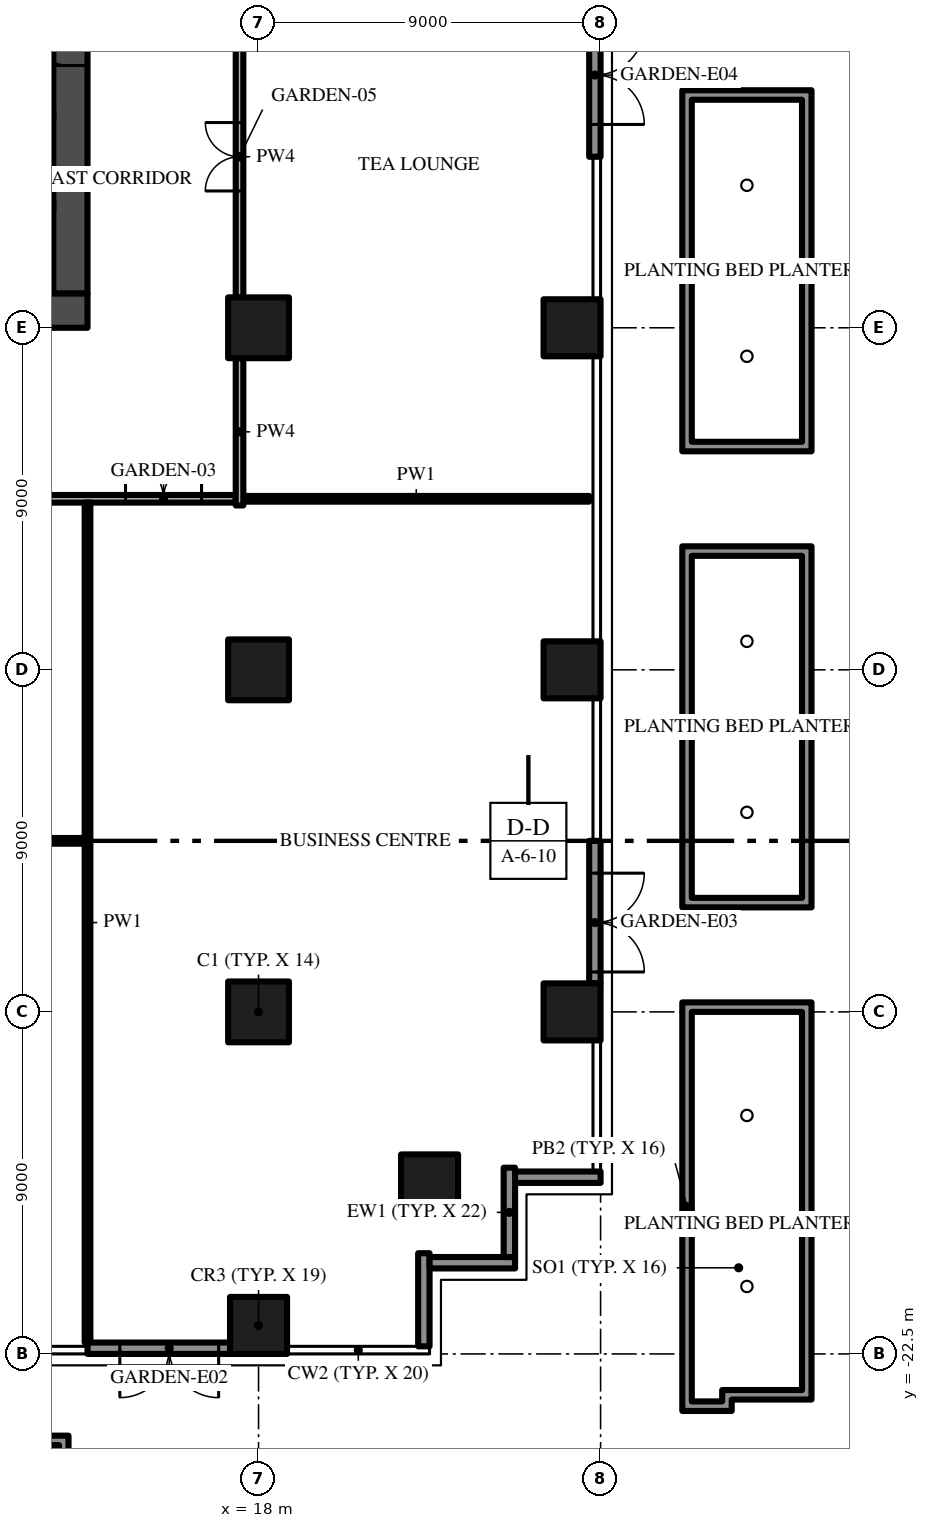
"""IFC4 building model, lengths in metres.
Left out: names, types, materials, properties, quantities, classifications, styles, units other than length and angle.
Written with IfcOpenShell. Run it as: python <this file> out.ifc"""

import sys

from ifc_helpers import new_model, si_unit, direction, frame, frame_2d, origin, origin_2d, place, context, subcontext, project, spatial, polyline, rectangle, outline, extrude, element, fill, save


model = new_model("IFC4")
c1 = context("Model", 3, precision=1e-05, world=origin(), true_north=direction((0.0, 1.0)))
c2 = subcontext(c1, "Body", "Model", "MODEL_VIEW")
j1 = project(units=[si_unit("LENGTHUNIT", "METRE"), si_unit("PLANEANGLEUNIT", "RADIAN")], contexts=[c1])
p1 = place(None, origin())
s1 = spatial("IfcSite", under=j1, at=p1, CompositionType="ELEMENT")
p2 = place(p1, origin())
s2 = spatial("IfcBuilding", under=s1, at=p2, CompositionType="ELEMENT")
p3 = place(p2, frame((0.0, 0.0, 10.5)))
s3 = spatial("IfcBuildingStorey", under=s2, at=p3, CompositionType="ELEMENT", Elevation=10.5)
p4 = place(p3, frame((-13.5, 4.95, -0.35), z_axis=(0.0, 0.0, 1.0), x_axis=(1.0, 0.0, 0.0)))
e1 = element("IfcWall", 1, at=p4, inside=s3, PredefinedType="SHEAR", context=c2, shape_type="SweptSolid", body=[
    extrude(rectangle(XDim=27.0, YDim=0.9, at=frame_2d((13.5, 0.0))), origin(), (0.0, 0.0, 1.0), 4.55),
])
p5 = place(p4, frame((12.0, 0.0, 0.35)))
e2 = element("IfcOpeningElement", 2, at=p5, cuts=e1, PredefinedType="OPENING", context=c2, shape_type="SweptSolid", body=[
    extrude(rectangle(XDim=3.0, YDim=2.4, at=frame_2d((1.5, 1.2))), frame((0.0, 0.46, 0.0), z_axis=(0.0, -1.0, 0.0), x_axis=(1.0, 0.0, 0.0)), (0.0, 0.0, 1.0), 0.92),
])
p6 = place(p4, frame((4.9, 0.0, 0.35)))
e3 = element("IfcOpeningElement", 3, at=p6, cuts=e1, PredefinedType="OPENING", context=c2, shape_type="SweptSolid", body=[
    extrude(rectangle(XDim=1.2, YDim=2.2, at=frame_2d((0.6, 1.1))), frame((0.0, 0.46, 0.0), z_axis=(0.0, -1.0, 0.0), x_axis=(1.0, 0.0, 0.0)), (0.0, 0.0, 1.0), 0.92),
])
p7 = place(p4, frame((20.75, 0.0, 0.35)))
e4 = element("IfcOpeningElement", 4, at=p7, cuts=e1, PredefinedType="OPENING", context=c2, shape_type="SweptSolid", body=[
    extrude(rectangle(XDim=1.5, YDim=2.2, at=frame_2d((0.75, 1.1))), frame((0.0, 0.46, 0.0), z_axis=(0.0, -1.0, 0.0), x_axis=(1.0, 0.0, 0.0)), (0.0, 0.0, 1.0), 0.92),
])
p8 = place(p4, frame((17.4, 0.0, 0.35)))
e5 = element("IfcOpeningElement", 5, at=p8, cuts=e1, PredefinedType="OPENING", context=c2, shape_type="SweptSolid", body=[
    extrude(rectangle(XDim=1.2, YDim=2.2, at=frame_2d((0.6, 1.1))), frame((0.0, 0.46, 0.0), z_axis=(0.0, -1.0, 0.0), x_axis=(1.0, 0.0, 0.0)), (0.0, 0.0, 1.0), 0.92),
])
p9 = place(p3, frame((13.05, 5.4, -0.35), z_axis=(0.0, 0.0, 1.0), x_axis=(0.0, 1.0, 0.0)))
e6 = element("IfcWall", 6, at=p9, inside=s3, PredefinedType="SHEAR", context=c2, shape_type="SweptSolid", body=[
    extrude(rectangle(XDim=16.2, YDim=0.9, at=frame_2d((8.1, 0.0))), origin(), (0.0, 0.0, 1.0), 4.55),
])
p10 = place(p9, frame((6.0, 0.0, 0.35)))
e7 = element("IfcOpeningElement", 7, at=p10, cuts=e6, PredefinedType="OPENING", context=c2, shape_type="SweptSolid", body=[
    extrude(rectangle(XDim=1.2, YDim=2.2, at=frame_2d((0.6, 1.1))), frame((0.0, 0.46, 0.0), z_axis=(0.0, -1.0, 0.0), x_axis=(1.0, 0.0, 0.0)), (0.0, 0.0, 1.0), 0.92),
])
p11 = place(p3, frame((18.0, -13.5, 0.0), z_axis=(0.0, 0.0, 1.0), x_axis=(1.0, 0.0, 0.0)))
e8 = element("IfcColumn", 8, at=p11, inside=s3, PredefinedType="COLUMN", context=c2, shape_type="SweptSolid", body=[
    extrude(rectangle(XDim=1.6, YDim=1.6, at=origin_2d()), origin(), (0.0, 0.0, 1.0), 4.2),
])
p12 = place(p3, frame((18.0, -21.75, 0.0), z_axis=(0.0, 0.0, 1.0), x_axis=(1.0, 0.0, 0.0)))
e9 = element("IfcColumn", 9, at=p12, inside=s3, PredefinedType="COLUMN", context=c2, shape_type="SweptSolid", body=[
    extrude(rectangle(XDim=1.5, YDim=1.5, at=origin_2d()), origin(), (0.0, 0.0, 1.0), 4.2),
])
for number, where, z_axis, x_axis in (
    (10, (18.0, -4.5, 0.0), (0.0, 0.0, 1.0), (1.0, 0.0, 0.0)),
    (11, (18.0, 4.5, 0.0), (0.0, 0.0, 1.0), (1.0, 0.0, 0.0)),
):
    element("IfcColumn", number, at=place(p3, frame(where, z_axis=z_axis, x_axis=x_axis)), inside=s3, PredefinedType="COLUMN", context=c2, shape_type="SweptSolid", body=[
        extrude(rectangle(XDim=1.6, YDim=1.6, at=origin_2d()), origin(), (0.0, 0.0, 1.0), 4.2),
    ])
for number, where, z_axis, x_axis in (
    (12, (26.25, -13.5, 0.0), (0.0, 0.0, 1.0), (1.0, 0.0, 0.0)),
    (13, (22.5, -18.0, 0.0), (0.0, 0.0, 1.0), (1.0, 0.0, 0.0)),
    (14, (26.25, -4.5, 0.0), (0.0, 0.0, 1.0), (1.0, 0.0, 0.0)),
    (15, (26.25, 4.5, 0.0), (0.0, 0.0, 1.0), (1.0, 0.0, 0.0)),
):
    element("IfcColumn", number, at=place(p3, frame(where, z_axis=z_axis, x_axis=x_axis)), inside=s3, PredefinedType="COLUMN", context=c2, shape_type="SweptSolid", body=[
        extrude(rectangle(XDim=1.5, YDim=1.5, at=origin_2d()), origin(), (0.0, 0.0, 1.0), 4.2),
    ])
p13 = place(p3, frame((17.25, -22.35, 0.0), z_axis=(0.0, 0.0, 1.0), x_axis=(-1.0, 0.0, 0.0)))
e16 = element("IfcWall", 16, at=p13, inside=s3, PredefinedType="SOLIDWALL", context=c2, shape_type="SweptSolid", body=[
    extrude(rectangle(XDim=3.75, YDim=0.3, at=frame_2d((1.875, 0.0))), origin(), (0.0, 0.0, 1.0), 4.2),
])
p14 = place(p13, frame((0.3, 0.0, 0.0)))
e17 = element("IfcOpeningElement", 17, at=p14, cuts=e16, PredefinedType="OPENING", context=c2, shape_type="SweptSolid", body=[
    extrude(rectangle(XDim=2.6, YDim=2.4, at=frame_2d((1.3, 1.2))), frame((0.0, 0.16, 0.0), z_axis=(0.0, -1.0, 0.0), x_axis=(1.0, 0.0, 0.0)), (0.0, 0.0, 1.0), 0.32),
])
p15 = place(p3, frame((22.35, -19.85, 0.0), z_axis=(0.0, 0.0, 1.0), x_axis=(0.0, -1.0, 0.0)))
e18 = element("IfcWall", 18, at=p15, inside=s3, PredefinedType="SOLIDWALL", context=c2, shape_type="SweptSolid", body=[
    extrude(rectangle(XDim=2.45, YDim=0.3, at=frame_2d((1.225, 0.0))), origin(), (0.0, 0.0, 1.0), 4.2),
])
p16 = place(p3, frame((24.75, -20.1, 0.0), z_axis=(0.0, 0.0, 1.0), x_axis=(-1.0, 0.0, 0.0)))
e19 = element("IfcWall", 19, at=p16, inside=s3, PredefinedType="SOLIDWALL", context=c2, shape_type="SweptSolid", body=[
    extrude(rectangle(XDim=2.25, YDim=0.3, at=frame_2d((1.125, 0.0))), origin(), (0.0, 0.0, 1.0), 4.2),
])
p17 = place(p3, frame((24.6, -17.6, 0.0), z_axis=(0.0, 0.0, 1.0), x_axis=(0.0, -1.0, 0.0)))
e20 = element("IfcWall", 20, at=p17, inside=s3, PredefinedType="SOLIDWALL", context=c2, shape_type="SweptSolid", body=[
    extrude(rectangle(XDim=2.35, YDim=0.3, at=frame_2d((1.175, 0.0))), origin(), (0.0, 0.0, 1.0), 4.2),
])
p18 = place(p3, frame((27.0, -17.85, 0.0), z_axis=(0.0, 0.0, 1.0), x_axis=(-1.0, 0.0, 0.0)))
e21 = element("IfcWall", 21, at=p18, inside=s3, PredefinedType="SOLIDWALL", context=c2, shape_type="SweptSolid", body=[
    extrude(rectangle(XDim=2.25, YDim=0.3, at=frame_2d((1.125, 0.0))), origin(), (0.0, 0.0, 1.0), 4.2),
])
p19 = place(p3, frame((26.85, -9.0, 0.0), z_axis=(0.0, 0.0, 1.0), x_axis=(0.0, -1.0, 0.0)))
e22 = element("IfcWall", 22, at=p19, inside=s3, PredefinedType="SOLIDWALL", context=c2, shape_type="SweptSolid", body=[
    extrude(rectangle(XDim=3.75, YDim=0.3, at=frame_2d((1.875, 0.0))), origin(), (0.0, 0.0, 1.0), 4.2),
])
p20 = place(p19, frame((0.85, 0.0, 0.0)))
e23 = element("IfcOpeningElement", 23, at=p20, cuts=e22, PredefinedType="OPENING", context=c2, shape_type="SweptSolid", body=[
    extrude(rectangle(XDim=2.6, YDim=2.4, at=frame_2d((1.3, 1.2))), frame((0.0, 0.16, 0.0), z_axis=(0.0, -1.0, 0.0), x_axis=(1.0, 0.0, 0.0)), (0.0, 0.0, 1.0), 0.32),
])
p21 = place(p3, frame((26.85, 12.75, 0.0), z_axis=(0.0, 0.0, 1.0), x_axis=(0.0, -1.0, 0.0)))
e24 = element("IfcWall", 24, at=p21, inside=s3, PredefinedType="SOLIDWALL", context=c2, shape_type="SweptSolid", body=[
    extrude(rectangle(XDim=3.75, YDim=0.3, at=frame_2d((1.875, 0.0))), origin(), (0.0, 0.0, 1.0), 4.2),
])
p22 = place(p21, frame((0.3, 0.0, 0.0)))
e25 = element("IfcOpeningElement", 25, at=p22, cuts=e24, PredefinedType="OPENING", context=c2, shape_type="SweptSolid", body=[
    extrude(rectangle(XDim=2.6, YDim=2.4, at=frame_2d((1.3, 1.2))), frame((0.0, 0.16, 0.0), z_axis=(0.0, -1.0, 0.0), x_axis=(1.0, 0.0, 0.0)), (0.0, 0.0, 1.0), 0.32),
])
for number, where, z_axis, x_axis in (
    (26, (9.65, 7.7, 0.0), (0.0, 0.0, 1.0), (1.0, 0.0, 0.0)),
    (27, (9.65, 10.1, 0.0), (0.0, 0.0, 1.0), (1.0, 0.0, 0.0)),
):
    element("IfcWall", number, at=place(p3, frame(where, z_axis=z_axis, x_axis=x_axis)), inside=s3, PredefinedType="SHEAR", context=c2, shape_type="SweptSolid", body=[
        extrude(rectangle(XDim=2.95, YDim=0.2, at=frame_2d((1.475, 0.0))), origin(), (0.0, 0.0, 1.0), 4.2),
    ])
p23 = place(p3, frame((-13.425, -9.0, 0.0), z_axis=(0.0, 0.0, 1.0), x_axis=(1.0, 0.0, 0.0)))
e28 = element("IfcWall", 28, at=p23, inside=s3, PredefinedType="PARTITIONING", context=c2, shape_type="SweptSolid", body=[
    extrude(rectangle(XDim=26.85, YDim=0.15, at=frame_2d((13.425, 0.0))), origin(), (0.0, 0.0, 1.0), 4.2),
])
p24 = place(p23, frame((12.5, 0.0, 0.0)))
e29 = element("IfcOpeningElement", 29, at=p24, cuts=e28, PredefinedType="OPENING", context=c2, shape_type="SweptSolid", body=[
    extrude(rectangle(XDim=1.8, YDim=2.4, at=frame_2d((0.9, 1.2))), frame((0.0, 0.085, 0.0), z_axis=(0.0, -1.0, 0.0), x_axis=(1.0, 0.0, 0.0)), (0.0, 0.0, 1.0), 0.17),
])
p25 = place(p3, frame((-17.4, 0.0, 0.0), z_axis=(0.0, 0.0, 1.0), x_axis=(1.0, 0.0, 0.0)))
e30 = element("IfcWall", 30, at=p25, inside=s3, PredefinedType="PARTITIONING", context=c2, shape_type="SweptSolid", body=[
    extrude(rectangle(XDim=34.8, YDim=0.2, at=frame_2d((17.4, 0.0))), origin(), (0.0, 0.0, 1.0), 4.2),
])
p26 = place(p25, frame((0.9, 0.0, 0.0)))
e31 = element("IfcOpeningElement", 31, at=p26, cuts=e30, PredefinedType="OPENING", context=c2, shape_type="SweptSolid", body=[
    extrude(rectangle(XDim=2.0, YDim=2.4, at=frame_2d((1.0, 1.2))), frame((0.0, 0.11, 0.0), z_axis=(0.0, -1.0, 0.0), x_axis=(1.0, 0.0, 0.0)), (0.0, 0.0, 1.0), 0.22),
])
p27 = place(p25, frame((16.4, 0.0, 0.0)))
e32 = element("IfcOpeningElement", 32, at=p27, cuts=e30, PredefinedType="OPENING", context=c2, shape_type="SweptSolid", body=[
    extrude(rectangle(XDim=2.0, YDim=2.4, at=frame_2d((1.0, 1.2))), frame((0.0, 0.11, 0.0), z_axis=(0.0, -1.0, 0.0), x_axis=(1.0, 0.0, 0.0)), (0.0, 0.0, 1.0), 0.22),
])
p28 = place(p25, frame((31.9, 0.0, 0.0)))
e33 = element("IfcOpeningElement", 33, at=p28, cuts=e30, PredefinedType="OPENING", context=c2, shape_type="SweptSolid", body=[
    extrude(rectangle(XDim=2.0, YDim=2.4, at=frame_2d((1.0, 1.2))), frame((0.0, 0.11, 0.0), z_axis=(0.0, -1.0, 0.0), x_axis=(1.0, 0.0, 0.0)), (0.0, 0.0, 1.0), 0.22),
])
p29 = place(p3, frame((17.6, 0.0, 0.0), z_axis=(0.0, 0.0, 1.0), x_axis=(1.0, 0.0, 0.0)))
e34 = element("IfcWall", 34, at=p29, inside=s3, PredefinedType="PARTITIONING", context=c2, shape_type="SweptSolid", body=[
    extrude(rectangle(XDim=9.1, YDim=0.15, at=frame_2d((4.55, 0.0))), origin(), (0.0, 0.0, 1.0), 4.2),
])
p30 = place(p3, frame((13.5, -22.2, 0.0), z_axis=(0.0, 0.0, 1.0), x_axis=(0.0, 1.0, 0.0)))
e35 = element("IfcWall", 35, at=p30, inside=s3, PredefinedType="PARTITIONING", context=c2, shape_type="SweptSolid", body=[
    extrude(rectangle(XDim=22.1, YDim=0.15, at=frame_2d((11.05, 0.0))), origin(), (0.0, 0.0, 1.0), 4.2),
])
p31 = place(p3, frame((17.5, -0.175, 0.0), z_axis=(0.0, 0.0, 1.0), x_axis=(0.0, 1.0, 0.0)))
e36 = element("IfcWall", 36, at=p31, inside=s3, PredefinedType="PARTITIONING", context=c2, shape_type="SweptSolid", body=[
    extrude(rectangle(XDim=3.875, YDim=0.2, at=frame_2d((1.938, 0.0))), origin(), (0.0, 0.0, 1.0), 4.2),
])
p32 = place(p3, frame((17.5, 5.3, 0.0), z_axis=(0.0, 0.0, 1.0), x_axis=(0.0, 1.0, 0.0)))
e37 = element("IfcWall", 37, at=p32, inside=s3, PredefinedType="PARTITIONING", context=c2, shape_type="SweptSolid", body=[
    extrude(rectangle(XDim=7.4, YDim=0.2, at=frame_2d((3.7, 0.0))), origin(), (0.0, 0.0, 1.0), 4.2),
])
p33 = place(p32, frame((2.8, 0.0, 0.0)))
e38 = element("IfcOpeningElement", 38, at=p33, cuts=e37, PredefinedType="OPENING", context=c2, shape_type="SweptSolid", body=[
    extrude(rectangle(XDim=1.8, YDim=2.4, at=frame_2d((0.9, 1.2))), frame((0.0, 0.11, 0.0), z_axis=(0.0, -1.0, 0.0), x_axis=(1.0, 0.0, 0.0)), (0.0, 0.0, 1.0), 0.22),
])
p34 = place(p3, frame((0.0, 0.0, 0.05)))
e39 = element("IfcWall", 39, at=p34, inside=s3, PredefinedType="USERDEFINED", context=c2, shape_type="SweptSolid", body=[
    extrude(outline(polyline([(1.25, -28.05), (13.0, -28.05), (13.0, -24.65), (1.25, -24.65), (1.25, -28.05)]), holes=[polyline([(1.5, -24.9), (12.75, -24.9), (12.75, -27.8), (1.5, -27.8), (1.5, -24.9)])]), origin(), (0.0, 0.0, 1.0), 0.9),
])
p35 = place(p3, frame((0.0, 0.0, 0.05)))
e40 = element("IfcWall", 40, at=p35, inside=s3, PredefinedType="USERDEFINED", context=c2, shape_type="SweptSolid", body=[
    extrude(outline(polyline([(29.15, -24.0), (30.45, -24.0), (30.45, -23.7), (32.55, -23.7), (32.55, -13.25), (29.15, -13.25), (29.15, -24.0)]), holes=[polyline([(29.4, -13.5), (32.3, -13.5), (32.3, -23.45), (30.2, -23.45), (30.2, -23.75), (29.4, -23.75), (29.4, -13.5)])]), origin(), (0.0, 0.0, 1.0), 0.9),
])
p36 = place(p3, frame((0.0, 0.0, 0.05)))
e41 = element("IfcWall", 41, at=p36, inside=s3, PredefinedType="USERDEFINED", context=c2, shape_type="SweptSolid", body=[
    extrude(outline(polyline([(29.15, -10.75), (32.55, -10.75), (32.55, -1.25), (29.15, -1.25), (29.15, -10.75)]), holes=[polyline([(29.4, -1.5), (32.3, -1.5), (32.3, -10.5), (29.4, -10.5), (29.4, -1.5)])]), origin(), (0.0, 0.0, 1.0), 0.9),
])
p37 = place(p3, frame((0.0, 0.0, 0.05)))
e42 = element("IfcWall", 42, at=p37, inside=s3, PredefinedType="USERDEFINED", context=c2, shape_type="SweptSolid", body=[
    extrude(outline(polyline([(29.15, 1.25), (32.55, 1.25), (32.55, 10.75), (29.15, 10.75), (29.15, 1.25)]), holes=[polyline([(29.4, 10.5), (32.3, 10.5), (32.3, 1.5), (29.4, 1.5), (29.4, 10.5)])]), origin(), (0.0, 0.0, 1.0), 0.9),
])
p38 = place(p14, origin())
e43 = element("IfcDoor", 43, at=p38, inside=s3, OperationType="SINGLE_SWING_LEFT", PredefinedType="DOOR", context=c2, shape_type="SweptSolid", body=[
    extrude(rectangle(XDim=2.6, YDim=2.4, at=frame_2d((1.3, 1.2))), frame((0.0, 0.025, 0.0), z_axis=(0.0, -1.0, 0.0), x_axis=(1.0, 0.0, 0.0)), (0.0, 0.0, 1.0), 0.05),
])
fill(e17, e43)
p39 = place(p20, origin())
e44 = element("IfcDoor", 44, at=p39, inside=s3, OperationType="SINGLE_SWING_LEFT", PredefinedType="DOOR", context=c2, shape_type="SweptSolid", body=[
    extrude(rectangle(XDim=2.6, YDim=2.4, at=frame_2d((1.3, 1.2))), frame((0.0, 0.025, 0.0), z_axis=(0.0, -1.0, 0.0), x_axis=(1.0, 0.0, 0.0)), (0.0, 0.0, 1.0), 0.05),
])
fill(e23, e44)
p40 = place(p22, origin())
e45 = element("IfcDoor", 45, at=p40, inside=s3, OperationType="SINGLE_SWING_LEFT", PredefinedType="DOOR", context=c2, shape_type="SweptSolid", body=[
    extrude(rectangle(XDim=2.6, YDim=2.4, at=frame_2d((1.3, 1.2))), frame((0.0, 0.025, 0.0), z_axis=(0.0, -1.0, 0.0), x_axis=(1.0, 0.0, 0.0)), (0.0, 0.0, 1.0), 0.05),
])
fill(e25, e45)
p41 = place(p10, frame((1.2, 0.0, 0.0), z_axis=(0.0, 0.0, 1.0), x_axis=(-1.0, 0.0, 0.0)))
e46 = element("IfcDoor", 46, at=p41, inside=s3, OperationType="SINGLE_SWING_LEFT", PredefinedType="DOOR", context=c2, shape_type="SweptSolid", body=[
    extrude(rectangle(XDim=1.2, YDim=2.2, at=frame_2d((0.6, 1.1))), frame((0.0, 0.025, 0.0), z_axis=(0.0, -1.0, 0.0), x_axis=(1.0, 0.0, 0.0)), (0.0, 0.0, 1.0), 0.05),
])
fill(e7, e46)
p42 = place(p28, origin())
e47 = element("IfcDoor", 47, at=p42, inside=s3, OperationType="DOUBLE_DOOR_SINGLE_SWING", PredefinedType="DOOR", context=c2, shape_type="SweptSolid", body=[
    extrude(rectangle(XDim=2.0, YDim=2.4, at=frame_2d((1.0, 1.2))), frame((0.0, 0.025, 0.0), z_axis=(0.0, -1.0, 0.0), x_axis=(1.0, 0.0, 0.0)), (0.0, 0.0, 1.0), 0.05),
])
fill(e33, e47)
p43 = place(p33, origin())
e48 = element("IfcDoor", 48, at=p43, inside=s3, OperationType="DOUBLE_DOOR_SINGLE_SWING", PredefinedType="DOOR", context=c2, shape_type="SweptSolid", body=[
    extrude(rectangle(XDim=1.8, YDim=2.4, at=frame_2d((0.9, 1.2))), frame((0.0, 0.025, 0.0), z_axis=(0.0, -1.0, 0.0), x_axis=(1.0, 0.0, 0.0)), (0.0, 0.0, 1.0), 0.05),
])
fill(e38, e48)
save(model, sys.argv[1])
